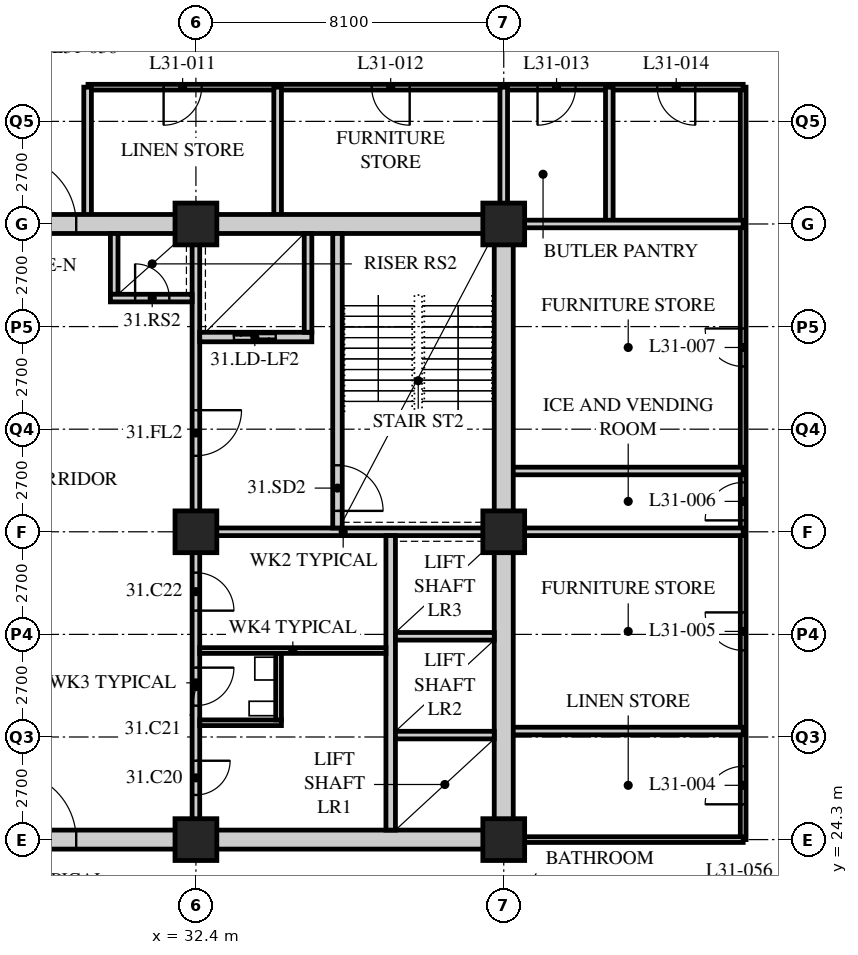
"""IFC4 building model, lengths in metres.
Left out: names, types, materials, properties, quantities, classifications, styles, units other than length and angle.
Written with IfcOpenShell. Run it as: python <this file> out.ifc"""

import sys

from ifc_helpers import new_model, si_unit, direction, frame, frame_2d, origin, origin_2d, place, context, subcontext, project, spatial, rectangle, hollow_rectangle, extrude, element, fill, save


model = new_model("IFC4")
c1 = context("Model", 3, precision=1e-05, world=origin(), true_north=direction((0.0, 1.0)))
c2 = subcontext(c1, "Body", "Model", "MODEL_VIEW")
j1 = project(units=[si_unit("LENGTHUNIT", "METRE"), si_unit("PLANEANGLEUNIT", "RADIAN")], contexts=[c1])
p1 = place(None, origin())
s1 = spatial("IfcSite", under=j1, at=p1, CompositionType="ELEMENT")
p2 = place(p1, origin())
s2 = spatial("IfcBuilding", under=s1, at=p2, CompositionType="ELEMENT")
p3 = place(p2, frame((0.0, 0.0, 123.8)))
s3 = spatial("IfcBuildingStorey", under=s2, at=p3, CompositionType="ELEMENT", Elevation=123.8)
for number, where, z_axis, x_axis in (
    (1, (32.4, 24.3, 0.0), (0.0, 0.0, 1.0), (1.0, 0.0, 0.0)),
    (2, (32.4, 32.4, 0.0), (0.0, 0.0, 1.0), (1.0, 0.0, 0.0)),
    (3, (32.4, 40.5, 0.0), (0.0, 0.0, 1.0), (1.0, 0.0, 0.0)),
    (4, (40.5, 24.3, 0.0), (0.0, 0.0, 1.0), (1.0, 0.0, 0.0)),
    (5, (40.5, 32.4, 0.0), (0.0, 0.0, 1.0), (1.0, 0.0, 0.0)),
    (6, (40.5, 40.5, 0.0), (0.0, 0.0, 1.0), (1.0, 0.0, 0.0)),
):
    element("IfcColumn", number, at=place(p3, frame(where, z_axis=z_axis, x_axis=x_axis)), inside=s3, PredefinedType="COLUMN", context=c2, shape_type="SweptSolid", body=[
        extrude(hollow_rectangle(XDim=1.1, YDim=1.1, WallThickness=0.1, at=origin_2d()), origin(), (0.0, 0.0, 1.0), 3.4),
    ])
p4 = place(p3, frame((46.8, 24.3, 0.0), z_axis=(0.0, 0.0, 1.0), x_axis=(0.0, 1.0, 0.0)))
e7 = element("IfcWall", 7, at=p4, inside=s3, PredefinedType="PARTITIONING", context=c2, shape_type="SweptSolid", body=[
    extrude(rectangle(XDim=19.8, YDim=0.15, at=frame_2d((9.9, 0.0))), origin(), (0.0, 0.0, 1.0), 3.19),
])
p5 = place(p4, frame((0.929, 0.0, 0.0)))
e8 = element("IfcOpeningElement", 8, at=p5, cuts=e7, PredefinedType="OPENING", context=c2, shape_type="SweptSolid", body=[
    extrude(rectangle(XDim=1.0, YDim=2.1, at=frame_2d((0.5, 1.05))), frame((0.0, 0.085, 0.0), z_axis=(0.0, -1.0, 0.0), x_axis=(1.0, 0.0, 0.0)), (0.0, 0.0, 1.0), 0.17),
])
p6 = place(p4, frame((4.979, 0.0, 0.0)))
e9 = element("IfcOpeningElement", 9, at=p6, cuts=e7, PredefinedType="OPENING", context=c2, shape_type="SweptSolid", body=[
    extrude(rectangle(XDim=1.0, YDim=2.1, at=frame_2d((0.5, 1.05))), frame((0.0, 0.085, 0.0), z_axis=(0.0, -1.0, 0.0), x_axis=(1.0, 0.0, 0.0)), (0.0, 0.0, 1.0), 0.17),
])
p7 = place(p4, frame((8.4, 0.0, 0.0)))
e10 = element("IfcOpeningElement", 10, at=p7, cuts=e7, PredefinedType="OPENING", context=c2, shape_type="SweptSolid", body=[
    extrude(rectangle(XDim=1.0, YDim=2.1, at=frame_2d((0.5, 1.05))), frame((0.0, 0.085, 0.0), z_axis=(0.0, -1.0, 0.0), x_axis=(1.0, 0.0, 0.0)), (0.0, 0.0, 1.0), 0.17),
])
p8 = place(p4, frame((12.45, 0.0, 0.0)))
e11 = element("IfcOpeningElement", 11, at=p8, cuts=e7, PredefinedType="OPENING", context=c2, shape_type="SweptSolid", body=[
    extrude(rectangle(XDim=1.0, YDim=2.1, at=frame_2d((0.5, 1.05))), frame((0.0, 0.085, 0.0), z_axis=(0.0, -1.0, 0.0), x_axis=(1.0, 0.0, 0.0)), (0.0, 0.0, 1.0), 0.17),
])
p9 = place(p3, frame((46.8, 44.1, 0.0), z_axis=(0.0, 0.0, 1.0), x_axis=(-1.0, 0.0, 0.0)))
e12 = element("IfcWall", 12, at=p9, inside=s3, PredefinedType="PARTITIONING", context=c2, shape_type="SweptSolid", body=[
    extrude(rectangle(XDim=17.24, YDim=0.15, at=frame_2d((8.62, 0.0))), origin(), (0.0, 0.0, 1.0), 3.19),
])
p10 = place(p9, frame((14.25, 0.0, 0.0)))
e13 = element("IfcOpeningElement", 13, at=p10, cuts=e12, PredefinedType="OPENING", context=c2, shape_type="SweptSolid", body=[
    extrude(rectangle(XDim=1.0, YDim=2.1, at=frame_2d((0.5, 1.05))), frame((0.0, 0.085, 0.0), z_axis=(0.0, -1.0, 0.0), x_axis=(1.0, 0.0, 0.0)), (0.0, 0.0, 1.0), 0.17),
])
p11 = place(p9, frame((8.775, 0.0, 0.0)))
e14 = element("IfcOpeningElement", 14, at=p11, cuts=e12, PredefinedType="OPENING", context=c2, shape_type="SweptSolid", body=[
    extrude(rectangle(XDim=1.0, YDim=2.1, at=frame_2d((0.5, 1.05))), frame((0.0, 0.085, 0.0), z_axis=(0.0, -1.0, 0.0), x_axis=(1.0, 0.0, 0.0)), (0.0, 0.0, 1.0), 0.17),
])
p12 = place(p9, frame((4.411, 0.0, 0.0)))
e15 = element("IfcOpeningElement", 15, at=p12, cuts=e12, PredefinedType="OPENING", context=c2, shape_type="SweptSolid", body=[
    extrude(rectangle(XDim=1.0, YDim=2.1, at=frame_2d((0.5, 1.05))), frame((0.0, 0.085, 0.0), z_axis=(0.0, -1.0, 0.0), x_axis=(1.0, 0.0, 0.0)), (0.0, 0.0, 1.0), 0.17),
])
p13 = place(p9, frame((1.261, 0.0, 0.0)))
e16 = element("IfcOpeningElement", 16, at=p13, cuts=e12, PredefinedType="OPENING", context=c2, shape_type="SweptSolid", body=[
    extrude(rectangle(XDim=1.0, YDim=2.1, at=frame_2d((0.5, 1.05))), frame((0.0, 0.085, 0.0), z_axis=(0.0, -1.0, 0.0), x_axis=(1.0, 0.0, 0.0)), (0.0, 0.0, 1.0), 0.17),
])
p14 = place(p3, frame((40.7, 24.3, 0.0), z_axis=(0.0, 0.0, 1.0), x_axis=(1.0, 0.0, 0.0)))
e17 = element("IfcWall", 17, at=p14, inside=s3, PredefinedType="PARTITIONING", context=c2, shape_type="SweptSolid", body=[
    extrude(rectangle(XDim=6.1, YDim=0.15, at=frame_2d((3.05, 0.0))), origin(), (0.0, 0.0, 1.0), 3.19),
])
for number, where, z_axis, x_axis in (
    (18, (40.5, 32.4, 0.0), (0.0, 0.0, 1.0), (1.0, 0.0, 0.0)),
    (19, (46.8, 27.157, 0.0), (0.0, 0.0, 1.0), (-1.0, 0.0, 0.0)),
    (20, (46.8, 34.0, 0.0), (0.0, 0.0, 1.0), (-1.0, 0.0, 0.0)),
):
    element("IfcWall", number, at=place(p3, frame(where, z_axis=z_axis, x_axis=x_axis)), inside=s3, PredefinedType="SOLIDWALL", context=c2, shape_type="SweptSolid", body=[
        extrude(rectangle(XDim=6.3, YDim=0.2, at=frame_2d((3.15, 0.0))), origin(), (0.0, 0.0, 1.0), 3.19),
    ])
p15 = place(p3, frame((40.5, 40.5, 0.0), z_axis=(0.0, 0.0, 1.0), x_axis=(0.0, 1.0, 0.0)))
e21 = element("IfcWall", 21, at=p15, inside=s3, PredefinedType="SOLIDWALL", context=c2, shape_type="SweptSolid", body=[
    extrude(rectangle(XDim=3.6, YDim=0.2, at=frame_2d((1.8, 0.0))), origin(), (0.0, 0.0, 1.0), 2.578),
])
for number, where, z_axis, x_axis in (
    (22, (34.55, 44.1, 0.0), (0.0, 0.0, 1.0), (0.0, -1.0, 0.0)),
    (23, (43.278, 44.1, 0.0), (0.0, 0.0, 1.0), (0.0, -1.0, 0.0)),
    (24, (29.55, 40.5, 0.0), (0.0, 0.0, 1.0), (0.0, 1.0, 0.0)),
):
    element("IfcWall", number, at=place(p3, frame(where, z_axis=z_axis, x_axis=x_axis)), inside=s3, PredefinedType="SOLIDWALL", context=c2, shape_type="SweptSolid", body=[
        extrude(rectangle(XDim=3.6, YDim=0.2, at=frame_2d((1.8, 0.0))), origin(), (0.0, 0.0, 1.0), 3.19),
    ])
p16 = place(p3, frame((40.5, 40.5, 0.0), z_axis=(0.0, 0.0, 1.0), x_axis=(1.0, 0.0, 0.0)))
e25 = element("IfcWall", 25, at=p16, inside=s3, PredefinedType="SOLIDWALL", context=c2, shape_type="SweptSolid", body=[
    extrude(rectangle(XDim=6.3, YDim=0.2, at=frame_2d((3.15, 0.0))), origin(), (0.0, 0.0, 1.0), 3.19),
])
p17 = place(p3, frame((15.95, 24.3, 0.0), z_axis=(0.0, 0.0, 1.0), x_axis=(1.0, 0.0, 0.0)))
e26 = element("IfcWall", 26, at=p17, inside=s3, PredefinedType="SOLIDWALL", context=c2, shape_type="SweptSolid", body=[
    extrude(rectangle(XDim=24.8, YDim=0.5, at=frame_2d((12.4, 0.0))), origin(), (0.0, 0.0, 1.0), 2.54),
])
p18 = place(p17, frame((11.5, 0.0, 0.0)))
e27 = element("IfcOpeningElement", 27, at=p18, cuts=e26, PredefinedType="OPENING", context=c2, shape_type="SweptSolid", body=[
    extrude(rectangle(XDim=1.8, YDim=2.4, at=frame_2d((0.9, 1.2))), frame((0.0, 0.26, 0.0), z_axis=(0.0, -1.0, 0.0), x_axis=(1.0, 0.0, 0.0)), (0.0, 0.0, 1.0), 0.52),
])
p19 = place(p3, frame((15.95, 40.5, 0.0), z_axis=(0.0, 0.0, 1.0), x_axis=(1.0, 0.0, 0.0)))
e28 = element("IfcWall", 28, at=p19, inside=s3, PredefinedType="SOLIDWALL", context=c2, shape_type="SweptSolid", body=[
    extrude(rectangle(XDim=24.8, YDim=0.5, at=frame_2d((12.4, 0.0))), origin(), (0.0, 0.0, 1.0), 2.54),
])
p20 = place(p19, frame((11.5, 0.0, 0.0)))
e29 = element("IfcOpeningElement", 29, at=p20, cuts=e28, PredefinedType="OPENING", context=c2, shape_type="SweptSolid", body=[
    extrude(rectangle(XDim=1.8, YDim=2.4, at=frame_2d((0.9, 1.2))), frame((0.0, 0.26, 0.0), z_axis=(0.0, -1.0, 0.0), x_axis=(1.0, 0.0, 0.0)), (0.0, 0.0, 1.0), 0.52),
])
p21 = place(p3, frame((40.5, 24.55, 0.0), z_axis=(0.0, 0.0, 1.0), x_axis=(0.0, 1.0, 0.0)))
e30 = element("IfcWall", 30, at=p21, inside=s3, PredefinedType="SOLIDWALL", context=c2, shape_type="SweptSolid", body=[
    extrude(rectangle(XDim=15.7, YDim=0.5, at=frame_2d((7.85, 0.0))), origin(), (0.0, 0.0, 1.0), 2.578),
])
p22 = place(p3, frame((32.3, 32.4, 0.0), z_axis=(0.0, 0.0, 1.0), x_axis=(1.0, 0.0, 0.0)))
e31 = element("IfcWall", 31, at=p22, inside=s3, PredefinedType="SOLIDWALL", context=c2, shape_type="SweptSolid", body=[
    extrude(rectangle(XDim=7.95, YDim=0.2, at=frame_2d((3.975, 0.0))), origin(), (0.0, 0.0, 1.0), 2.578),
])
p23 = place(p3, frame((32.4, 32.5, 0.0), z_axis=(0.0, 0.0, 1.0), x_axis=(0.0, 1.0, 0.0)))
e32 = element("IfcWall", 32, at=p23, inside=s3, PredefinedType="SOLIDWALL", context=c2, shape_type="SweptSolid", body=[
    extrude(rectangle(XDim=7.75, YDim=0.2, at=frame_2d((3.875, 0.0))), origin(), (0.0, 0.0, 1.0), 2.578),
])
p24 = place(p23, frame((1.9, 0.0, 0.0)))
e33 = element("IfcOpeningElement", 33, at=p24, cuts=e32, PredefinedType="OPENING", context=c2, shape_type="SweptSolid", body=[
    extrude(rectangle(XDim=1.2, YDim=2.1, at=frame_2d((0.6, 1.05))), frame((0.0, 0.11, 0.0), z_axis=(0.0, -1.0, 0.0), x_axis=(1.0, 0.0, 0.0)), (0.0, 0.0, 1.0), 0.22),
])
p25 = place(p3, frame((37.525, 24.55, 0.0), z_axis=(0.0, 0.0, 1.0), x_axis=(0.0, 1.0, 0.0)))
e34 = element("IfcWall", 34, at=p25, inside=s3, PredefinedType="SOLIDWALL", context=c2, shape_type="SweptSolid", body=[
    extrude(rectangle(XDim=7.75, YDim=0.25, at=frame_2d((3.875, 0.0))), origin(), (0.0, 0.0, 1.0), 3.19),
])
for number, where, z_axis, x_axis in (
    (35, (37.65, 27.05, 0.0), (0.0, 0.0, 1.0), (1.0, 0.0, 0.0)),
    (36, (37.65, 29.65, 0.0), (0.0, 0.0, 1.0), (1.0, 0.0, 0.0)),
):
    element("IfcWall", number, at=place(p3, frame(where, z_axis=z_axis, x_axis=x_axis)), inside=s3, PredefinedType="SOLIDWALL", context=c2, shape_type="SweptSolid", body=[
        extrude(rectangle(XDim=2.6, YDim=0.2, at=frame_2d((1.3, 0.0))), origin(), (0.0, 0.0, 1.0), 3.19),
    ])
p26 = place(p3, frame((36.125, 32.5, 0.0), z_axis=(0.0, 0.0, 1.0), x_axis=(0.0, 1.0, 0.0)))
e37 = element("IfcWall", 37, at=p26, inside=s3, PredefinedType="SOLIDWALL", context=c2, shape_type="SweptSolid", body=[
    extrude(rectangle(XDim=7.75, YDim=0.25, at=frame_2d((3.875, 0.0))), origin(), (0.0, 0.0, 1.0), 3.19),
])
p27 = place(p26, frame((0.45, 0.0, 0.0)))
e38 = element("IfcOpeningElement", 38, at=p27, cuts=e37, PredefinedType="OPENING", context=c2, shape_type="SweptSolid", body=[
    extrude(rectangle(XDim=1.2, YDim=2.1, at=frame_2d((0.6, 1.05))), frame((0.0, 0.135, 0.0), z_axis=(0.0, -1.0, 0.0), x_axis=(1.0, 0.0, 0.0)), (0.0, 0.0, 1.0), 0.27),
])
p28 = place(p3, frame((32.5, 37.525, 0.0), z_axis=(0.0, 0.0, 1.0), x_axis=(1.0, 0.0, 0.0)))
e39 = element("IfcWall", 39, at=p28, inside=s3, PredefinedType="SOLIDWALL", context=c2, shape_type="SweptSolid", body=[
    extrude(rectangle(XDim=2.95, YDim=0.25, at=frame_2d((1.475, 0.0))), origin(), (0.0, 0.0, 1.0), 3.19),
])
p29 = place(p28, frame((0.9, 0.0, 0.0)))
e40 = element("IfcOpeningElement", 40, at=p29, cuts=e39, PredefinedType="OPENING", context=c2, shape_type="SweptSolid", body=[
    extrude(rectangle(XDim=1.1, YDim=2.4, at=frame_2d((0.55, 1.2))), frame((0.0, 0.135, 0.0), z_axis=(0.0, -1.0, 0.0), x_axis=(1.0, 0.0, 0.0)), (0.0, 0.0, 1.0), 0.27),
])
p30 = place(p3, frame((35.35, 37.65, 0.0), z_axis=(0.0, 0.0, 1.0), x_axis=(0.0, 1.0, 0.0)))
e41 = element("IfcWall", 41, at=p30, inside=s3, PredefinedType="SOLIDWALL", context=c2, shape_type="SweptSolid", body=[
    extrude(rectangle(XDim=2.6, YDim=0.2, at=frame_2d((1.3, 0.0))), origin(), (0.0, 0.0, 1.0), 3.19),
])
p31 = place(p3, frame((30.25, 38.65, 0.0), z_axis=(0.0, 0.0, 1.0), x_axis=(0.0, 1.0, 0.0)))
e42 = element("IfcWall", 42, at=p31, inside=s3, PredefinedType="SOLIDWALL", context=c2, shape_type="SweptSolid", body=[
    extrude(rectangle(XDim=1.6, YDim=0.2, at=frame_2d((0.8, 0.0))), origin(), (0.0, 0.0, 1.0), 3.19),
])
p32 = place(p3, frame((30.15, 38.55, 0.0), z_axis=(0.0, 0.0, 1.0), x_axis=(1.0, 0.0, 0.0)))
e43 = element("IfcWall", 43, at=p32, inside=s3, PredefinedType="SOLIDWALL", context=c2, shape_type="SweptSolid", body=[
    extrude(rectangle(XDim=2.15, YDim=0.2, at=frame_2d((1.075, 0.0))), origin(), (0.0, 0.0, 1.0), 3.19),
])
p33 = place(p32, frame((0.65, 0.0, 0.0)))
e44 = element("IfcOpeningElement", 44, at=p33, cuts=e43, PredefinedType="OPENING", context=c2, shape_type="SweptSolid", body=[
    extrude(rectangle(XDim=0.9, YDim=2.1, at=frame_2d((0.45, 1.05))), frame((0.0, 0.11, 0.0), z_axis=(0.0, -1.0, 0.0), x_axis=(1.0, 0.0, 0.0)), (0.0, 0.0, 1.0), 0.22),
])
p34 = place(p3, frame((32.4, 24.55, 0.0), z_axis=(0.0, 0.0, 1.0), x_axis=(0.0, 1.0, 0.0)))
e45 = element("IfcWall", 45, at=p34, inside=s3, PredefinedType="PARTITIONING", context=c2, shape_type="SweptSolid", body=[
    extrude(rectangle(XDim=7.75, YDim=0.2, at=frame_2d((3.875, 0.0))), origin(), (0.0, 0.0, 1.0), 2.578),
])
p35 = place(p34, frame((0.925, 0.0, 0.0)))
e46 = element("IfcOpeningElement", 46, at=p35, cuts=e45, PredefinedType="OPENING", context=c2, shape_type="SweptSolid", body=[
    extrude(rectangle(XDim=0.9, YDim=2.1, at=frame_2d((0.45, 1.05))), frame((0.0, 0.11, 0.0), z_axis=(0.0, -1.0, 0.0), x_axis=(1.0, 0.0, 0.0)), (0.0, 0.0, 1.0), 0.22),
])
p36 = place(p34, frame((3.275, 0.0, 0.0)))
e47 = element("IfcOpeningElement", 47, at=p36, cuts=e45, PredefinedType="OPENING", context=c2, shape_type="SweptSolid", body=[
    extrude(rectangle(XDim=1.0, YDim=2.1, at=frame_2d((0.5, 1.05))), frame((0.0, 0.11, 0.0), z_axis=(0.0, -1.0, 0.0), x_axis=(1.0, 0.0, 0.0)), (0.0, 0.0, 1.0), 0.22),
])
p37 = place(p34, frame((5.775, 0.0, 0.0)))
e48 = element("IfcOpeningElement", 48, at=p37, cuts=e45, PredefinedType="OPENING", context=c2, shape_type="SweptSolid", body=[
    extrude(rectangle(XDim=1.0, YDim=2.1, at=frame_2d((0.5, 1.05))), frame((0.0, 0.11, 0.0), z_axis=(0.0, -1.0, 0.0), x_axis=(1.0, 0.0, 0.0)), (0.0, 0.0, 1.0), 0.22),
])
p38 = place(p3, frame((32.5, 27.375, 0.0), z_axis=(0.0, 0.0, 1.0), x_axis=(1.0, 0.0, 0.0)))
e49 = element("IfcWall", 49, at=p38, inside=s3, PredefinedType="PARTITIONING", context=c2, shape_type="SweptSolid", body=[
    extrude(rectangle(XDim=2.15, YDim=0.15, at=frame_2d((1.075, 0.0))), origin(), (0.0, 0.0, 1.0), 3.19),
])
p39 = place(p3, frame((32.5, 29.275, 0.0), z_axis=(0.0, 0.0, 1.0), x_axis=(1.0, 0.0, 0.0)))
e50 = element("IfcWall", 50, at=p39, inside=s3, PredefinedType="PARTITIONING", context=c2, shape_type="SweptSolid", body=[
    extrude(rectangle(XDim=4.9, YDim=0.15, at=frame_2d((2.45, 0.0))), origin(), (0.0, 0.0, 1.0), 3.19),
])
p40 = place(p3, frame((34.575, 27.45, 0.0), z_axis=(0.0, 0.0, 1.0), x_axis=(0.0, 1.0, 0.0)))
e51 = element("IfcWall", 51, at=p40, inside=s3, PredefinedType="PARTITIONING", context=c2, shape_type="SweptSolid", body=[
    extrude(rectangle(XDim=1.75, YDim=0.15, at=frame_2d((0.875, 0.0))), origin(), (0.0, 0.0, 1.0), 3.19),
])
p41 = place(p5, origin())
e52 = element("IfcDoor", 52, at=p41, inside=s3, OperationType="SINGLE_SWING_LEFT", PredefinedType="DOOR", context=c2, shape_type="SweptSolid", body=[
    extrude(rectangle(XDim=1.0, YDim=2.1, at=frame_2d((0.5, 1.05))), frame((0.0, 0.025, 0.0), z_axis=(0.0, -1.0, 0.0), x_axis=(1.0, 0.0, 0.0)), (0.0, 0.0, 1.0), 0.05),
])
fill(e8, e52)
p42 = place(p6, origin())
e53 = element("IfcDoor", 53, at=p42, inside=s3, OperationType="SINGLE_SWING_RIGHT", PredefinedType="DOOR", context=c2, shape_type="SweptSolid", body=[
    extrude(rectangle(XDim=1.0, YDim=2.1, at=frame_2d((0.5, 1.05))), frame((0.0, 0.025, 0.0), z_axis=(0.0, -1.0, 0.0), x_axis=(1.0, 0.0, 0.0)), (0.0, 0.0, 1.0), 0.05),
])
fill(e9, e53)
p43 = place(p7, origin())
e54 = element("IfcDoor", 54, at=p43, inside=s3, OperationType="SINGLE_SWING_LEFT", PredefinedType="DOOR", context=c2, shape_type="SweptSolid", body=[
    extrude(rectangle(XDim=1.0, YDim=2.1, at=frame_2d((0.5, 1.05))), frame((0.0, 0.025, 0.0), z_axis=(0.0, -1.0, 0.0), x_axis=(1.0, 0.0, 0.0)), (0.0, 0.0, 1.0), 0.05),
])
fill(e10, e54)
p44 = place(p8, origin())
e55 = element("IfcDoor", 55, at=p44, inside=s3, OperationType="SINGLE_SWING_RIGHT", PredefinedType="DOOR", context=c2, shape_type="SweptSolid", body=[
    extrude(rectangle(XDim=1.0, YDim=2.1, at=frame_2d((0.5, 1.05))), frame((0.0, 0.025, 0.0), z_axis=(0.0, -1.0, 0.0), x_axis=(1.0, 0.0, 0.0)), (0.0, 0.0, 1.0), 0.05),
])
fill(e11, e55)
p45 = place(p10, origin())
e56 = element("IfcDoor", 56, at=p45, inside=s3, OperationType="SINGLE_SWING_RIGHT", PredefinedType="DOOR", context=c2, shape_type="SweptSolid", body=[
    extrude(rectangle(XDim=1.0, YDim=2.1, at=frame_2d((0.5, 1.05))), frame((0.0, 0.025, 0.0), z_axis=(0.0, -1.0, 0.0), x_axis=(1.0, 0.0, 0.0)), (0.0, 0.0, 1.0), 0.05),
])
fill(e13, e56)
p46 = place(p11, origin())
e57 = element("IfcDoor", 57, at=p46, inside=s3, OperationType="SINGLE_SWING_LEFT", PredefinedType="DOOR", context=c2, shape_type="SweptSolid", body=[
    extrude(rectangle(XDim=1.0, YDim=2.1, at=frame_2d((0.5, 1.05))), frame((0.0, 0.025, 0.0), z_axis=(0.0, -1.0, 0.0), x_axis=(1.0, 0.0, 0.0)), (0.0, 0.0, 1.0), 0.05),
])
fill(e14, e57)
p47 = place(p12, origin())
e58 = element("IfcDoor", 58, at=p47, inside=s3, OperationType="SINGLE_SWING_RIGHT", PredefinedType="DOOR", context=c2, shape_type="SweptSolid", body=[
    extrude(rectangle(XDim=1.0, YDim=2.1, at=frame_2d((0.5, 1.05))), frame((0.0, 0.025, 0.0), z_axis=(0.0, -1.0, 0.0), x_axis=(1.0, 0.0, 0.0)), (0.0, 0.0, 1.0), 0.05),
])
fill(e15, e58)
p48 = place(p13, origin())
e59 = element("IfcDoor", 59, at=p48, inside=s3, OperationType="SINGLE_SWING_LEFT", PredefinedType="DOOR", context=c2, shape_type="SweptSolid", body=[
    extrude(rectangle(XDim=1.0, YDim=2.1, at=frame_2d((0.5, 1.05))), frame((0.0, 0.025, 0.0), z_axis=(0.0, -1.0, 0.0), x_axis=(1.0, 0.0, 0.0)), (0.0, 0.0, 1.0), 0.05),
])
fill(e16, e59)
p49 = place(p35, origin())
e60 = element("IfcDoor", 60, at=p49, inside=s3, OperationType="SINGLE_SWING_LEFT", PredefinedType="DOOR", context=c2, shape_type="SweptSolid", body=[
    extrude(rectangle(XDim=0.9, YDim=2.1, at=frame_2d((0.45, 1.05))), frame((0.0, 0.025, 0.0), z_axis=(0.0, -1.0, 0.0), x_axis=(1.0, 0.0, 0.0)), (0.0, 0.0, 1.0), 0.05),
])
fill(e46, e60)
p50 = place(p36, origin())
e61 = element("IfcDoor", 61, at=p50, inside=s3, OperationType="SINGLE_SWING_LEFT", PredefinedType="DOOR", context=c2, shape_type="SweptSolid", body=[
    extrude(rectangle(XDim=1.0, YDim=2.1, at=frame_2d((0.5, 1.05))), frame((0.0, 0.025, 0.0), z_axis=(0.0, -1.0, 0.0), x_axis=(1.0, 0.0, 0.0)), (0.0, 0.0, 1.0), 0.05),
])
fill(e47, e61)
p51 = place(p37, origin())
e62 = element("IfcDoor", 62, at=p51, inside=s3, OperationType="SINGLE_SWING_RIGHT", PredefinedType="DOOR", context=c2, shape_type="SweptSolid", body=[
    extrude(rectangle(XDim=1.0, YDim=2.1, at=frame_2d((0.5, 1.05))), frame((0.0, 0.025, 0.0), z_axis=(0.0, -1.0, 0.0), x_axis=(1.0, 0.0, 0.0)), (0.0, 0.0, 1.0), 0.05),
])
fill(e48, e62)
p52 = place(p27, origin())
e63 = element("IfcDoor", 63, at=p52, inside=s3, OperationType="SINGLE_SWING_RIGHT", PredefinedType="DOOR", context=c2, shape_type="SweptSolid", body=[
    extrude(rectangle(XDim=1.2, YDim=2.1, at=frame_2d((0.6, 1.05))), frame((0.0, 0.025, 0.0), z_axis=(0.0, -1.0, 0.0), x_axis=(1.0, 0.0, 0.0)), (0.0, 0.0, 1.0), 0.05),
])
fill(e38, e63)
p53 = place(p24, origin())
e64 = element("IfcDoor", 64, at=p53, inside=s3, OperationType="SINGLE_SWING_LEFT", PredefinedType="DOOR", context=c2, shape_type="SweptSolid", body=[
    extrude(rectangle(XDim=1.2, YDim=2.1, at=frame_2d((0.6, 1.05))), frame((0.0, 0.025, 0.0), z_axis=(0.0, -1.0, 0.0), x_axis=(1.0, 0.0, 0.0)), (0.0, 0.0, 1.0), 0.05),
])
fill(e33, e64)
p54 = place(p33, origin())
e65 = element("IfcDoor", 65, at=p54, inside=s3, OperationType="SINGLE_SWING_LEFT", PredefinedType="DOOR", context=c2, shape_type="SweptSolid", body=[
    extrude(rectangle(XDim=0.9, YDim=2.1, at=frame_2d((0.45, 1.05))), frame((0.0, 0.025, 0.0), z_axis=(0.0, -1.0, 0.0), x_axis=(1.0, 0.0, 0.0)), (0.0, 0.0, 1.0), 0.05),
])
fill(e44, e65)
p55 = place(p29, origin())
e66 = element("IfcDoor", 66, at=p55, inside=s3, OperationType="DOUBLE_DOOR_SLIDING", PredefinedType="DOOR", context=c2, shape_type="SweptSolid", body=[
    extrude(rectangle(XDim=1.1, YDim=2.4, at=frame_2d((0.55, 1.2))), frame((0.0, 0.025, 0.0), z_axis=(0.0, -1.0, 0.0), x_axis=(1.0, 0.0, 0.0)), (0.0, 0.0, 1.0), 0.05),
])
fill(e40, e66)
p56 = place(p18, origin())
e67 = element("IfcDoor", 67, at=p56, inside=s3, OperationType="DOUBLE_DOOR_SINGLE_SWING", PredefinedType="DOOR", context=c2, shape_type="SweptSolid", body=[
    extrude(rectangle(XDim=1.8, YDim=2.4, at=frame_2d((0.9, 1.2))), frame((0.0, 0.025, 0.0), z_axis=(0.0, -1.0, 0.0), x_axis=(1.0, 0.0, 0.0)), (0.0, 0.0, 1.0), 0.05),
])
fill(e27, e67)
p57 = place(p20, origin())
e68 = element("IfcDoor", 68, at=p57, inside=s3, OperationType="DOUBLE_DOOR_SINGLE_SWING", PredefinedType="DOOR", context=c2, shape_type="SweptSolid", body=[
    extrude(rectangle(XDim=1.8, YDim=2.4, at=frame_2d((0.9, 1.2))), frame((0.0, 0.025, 0.0), z_axis=(0.0, -1.0, 0.0), x_axis=(1.0, 0.0, 0.0)), (0.0, 0.0, 1.0), 0.05),
])
fill(e29, e68)
save(model, sys.argv[1])
